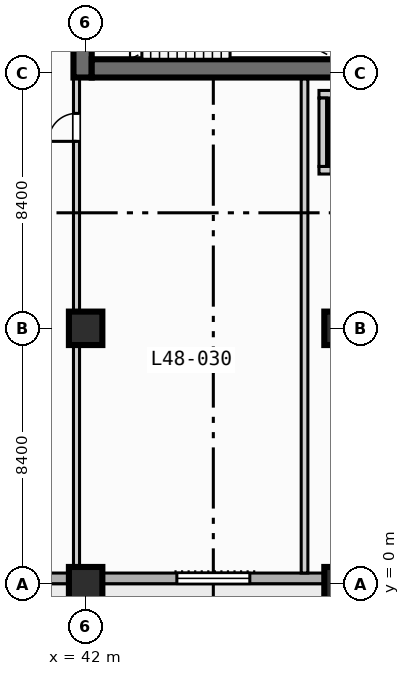
"""IFC4 building model, lengths in metres.
Left out: names, types, materials, properties, quantities, classifications, styles, units other than length and angle.
Written with IfcOpenShell. Run it as: python <this file> out.ifc"""

import sys

from ifc_helpers import new_model, si_unit, direction, frame, frame_2d, origin, origin_2d, place, context, subcontext, project, spatial, rectangle, extrude, element, fill, save


model = new_model("IFC4")
c1 = context("Model", 3, precision=1e-05, world=origin(), true_north=direction((0.0, 1.0)))
c2 = subcontext(c1, "Body", "Model", "MODEL_VIEW")
j1 = project(units=[si_unit("LENGTHUNIT", "METRE"), si_unit("PLANEANGLEUNIT", "RADIAN")], contexts=[c1])
p1 = place(None, origin())
s1 = spatial("IfcSite", under=j1, at=p1, CompositionType="ELEMENT")
p2 = place(p1, origin())
s2 = spatial("IfcBuilding", under=s1, at=p2, CompositionType="ELEMENT")
p3 = place(p2, frame((0.0, 0.0, 197.6)))
s3 = spatial("IfcBuildingStorey", under=s2, at=p3, CompositionType="ELEMENT", Elevation=197.6)
p4 = place(p3, frame((41.9, 16.65, 0.0), z_axis=(0.0, 0.0, 1.0), x_axis=(0.0, 1.0, 0.0)))
e1 = element("IfcWall", 1, at=p4, inside=s3, PredefinedType="SHEAR", context=c2, shape_type="SweptSolid", body=[
    extrude(rectangle(XDim=1.35, YDim=0.6, at=frame_2d((0.675, 0.0))), origin(), (0.0, 0.0, 1.0), 3.47),
])
p5 = place(p3, frame((42.2, 16.95, 0.0), z_axis=(0.0, 0.0, 1.0), x_axis=(1.0, 0.0, 0.0)))
e2 = element("IfcWall", 2, at=p5, inside=s3, PredefinedType="SHEAR", context=c2, shape_type="SweptSolid", body=[
    extrude(rectangle(XDim=16.35, YDim=0.6, at=frame_2d((8.175, 0.0))), origin(), (0.0, 0.0, 1.0), 3.47),
])
for number, where, z_axis, x_axis in (
    (3, (42.0, 0.0, 0.0), (0.0, 0.0, 1.0), (1.0, 0.0, 0.0)),
    (4, (42.0, 8.4, 0.0), (0.0, 0.0, 1.0), (1.0, 0.0, 0.0)),
    (5, (50.4, 0.0, 0.0), (0.0, 0.0, 1.0), (1.0, 0.0, 0.0)),
    (6, (50.4, 8.4, 0.0), (0.0, 0.0, 1.0), (1.0, 0.0, 0.0)),
):
    element("IfcColumn", number, at=place(p3, frame(where, z_axis=z_axis, x_axis=x_axis)), inside=s3, PredefinedType="COLUMN", context=c2, shape_type="SweptSolid", body=[
        extrude(rectangle(XDim=1.1, YDim=1.1, at=origin_2d()), origin(), (0.0, 0.0, 1.0), 3.7),
    ])
p6 = place(p3, frame((72.425, 0.175, 0.0), z_axis=(0.0, 0.0, 1.0), x_axis=(-1.0, 0.0, 0.0)))
e7 = element("IfcWall", 7, at=p6, inside=s3, PredefinedType="STANDARD", context=c2, shape_type="SweptSolid", body=[
    extrude(rectangle(XDim=69.25, YDim=0.35, at=frame_2d((34.625, 0.0))), origin(), (0.0, 0.0, 1.0), 3.47),
])
p7 = place(p6, frame((50.725, 0.0, 0.0)))
e8 = element("IfcOpeningElement", 8, at=p7, cuts=e7, PredefinedType="OPENING", context=c2, shape_type="SweptSolid", body=[
    extrude(rectangle(XDim=1.4, YDim=2.2, at=frame_2d((0.7, 1.1))), frame((0.0, 0.185, 0.0), z_axis=(0.0, -1.0, 0.0), x_axis=(1.0, 0.0, 0.0)), (0.0, 0.0, 1.0), 0.37),
])
p8 = place(p6, frame((58.625, 0.0, 0.85)))
e9 = element("IfcOpeningElement", 9, at=p8, cuts=e7, PredefinedType="OPENING", context=c2, shape_type="SweptSolid", body=[
    extrude(rectangle(XDim=2.4, YDim=1.95, at=frame_2d((1.2, 0.975))), frame((0.0, 0.185, 0.0), z_axis=(0.0, -1.0, 0.0), x_axis=(1.0, 0.0, 0.0)), (0.0, 0.0, 1.0), 0.37),
])
p9 = place(p6, frame((41.825, 0.0, 0.85)))
e10 = element("IfcOpeningElement", 10, at=p9, cuts=e7, PredefinedType="OPENING", context=c2, shape_type="SweptSolid", body=[
    extrude(rectangle(XDim=2.4, YDim=1.95, at=frame_2d((1.2, 0.975))), frame((0.0, 0.185, 0.0), z_axis=(0.0, -1.0, 0.0), x_axis=(1.0, 0.0, 0.0)), (0.0, 0.0, 1.0), 0.37),
])
p10 = place(p6, frame((33.725, 0.0, 0.85)))
e11 = element("IfcOpeningElement", 11, at=p10, cuts=e7, PredefinedType="OPENING", context=c2, shape_type="SweptSolid", body=[
    extrude(rectangle(XDim=1.8, YDim=1.8, at=frame_2d((0.9, 0.9))), frame((0.0, 0.185, 0.0), z_axis=(0.0, -1.0, 0.0), x_axis=(1.0, 0.0, 0.0)), (0.0, 0.0, 1.0), 0.37),
])
p11 = place(p6, frame((25.025, 0.0, 0.85)))
e12 = element("IfcOpeningElement", 12, at=p11, cuts=e7, PredefinedType="OPENING", context=c2, shape_type="SweptSolid", body=[
    extrude(rectangle(XDim=2.4, YDim=1.95, at=frame_2d((1.2, 0.975))), frame((0.0, 0.185, 0.0), z_axis=(0.0, -1.0, 0.0), x_axis=(1.0, 0.0, 0.0)), (0.0, 0.0, 1.0), 0.37),
])
p12 = place(p6, frame((64.875, 0.0, 0.85)))
e13 = element("IfcOpeningElement", 13, at=p12, cuts=e7, PredefinedType="OPENING", context=c2, shape_type="SweptSolid", body=[
    extrude(rectangle(XDim=1.8, YDim=1.8, at=frame_2d((0.9, 0.9))), frame((0.0, 0.185, 0.0), z_axis=(0.0, -1.0, 0.0), x_axis=(1.0, 0.0, 0.0)), (0.0, 0.0, 1.0), 0.37),
])
p13 = place(p3, frame((49.675, 13.6, 0.0), z_axis=(0.0, 0.0, 1.0), x_axis=(1.0, 0.0, 0.0)))
e14 = element("IfcWall", 14, at=p13, inside=s3, PredefinedType="SOLIDWALL", context=c2, shape_type="SweptSolid", body=[
    extrude(rectangle(XDim=2.25, YDim=0.25, at=frame_2d((1.125, 0.0))), origin(), (0.0, 0.0, 1.0), 3.47),
])
p14 = place(p13, frame((0.4, 0.0, 0.0)))
e15 = element("IfcOpeningElement", 15, at=p14, cuts=e14, PredefinedType="OPENING", context=c2, shape_type="SweptSolid", body=[
    extrude(rectangle(XDim=1.1, YDim=2.15, at=frame_2d((0.55, 1.075))), frame((0.0, 0.135, 0.0), z_axis=(0.0, -1.0, 0.0), x_axis=(1.0, 0.0, 0.0)), (0.0, 0.0, 1.0), 0.27),
])
for number, where, z_axis, x_axis in (
    (16, (49.675, 16.1, 0.0), (0.0, 0.0, 1.0), (1.0, 0.0, 0.0)),
    (17, (49.8, 13.725, 0.0), (0.0, 0.0, 1.0), (0.0, 1.0, 0.0)),
):
    element("IfcWall", number, at=place(p3, frame(where, z_axis=z_axis, x_axis=x_axis)), inside=s3, PredefinedType="SOLIDWALL", context=c2, shape_type="SweptSolid", body=[
        extrude(rectangle(XDim=2.25, YDim=0.25, at=frame_2d((1.125, 0.0))), origin(), (0.0, 0.0, 1.0), 3.47),
    ])
p15 = place(p3, frame((41.7, 0.35, 0.0), z_axis=(0.0, 0.0, 1.0), x_axis=(0.0, 1.0, 0.0)))
e18 = element("IfcWall", 18, at=p15, inside=s3, PredefinedType="PARTITIONING", context=c2, shape_type="SweptSolid", body=[
    extrude(rectangle(XDim=16.25, YDim=0.2, at=frame_2d((8.125, 0.0))), origin(), (0.0, 0.0, 1.0), 2.82),
])
p16 = place(p15, frame((14.2, 0.0, 0.0)))
e19 = element("IfcOpeningElement", 19, at=p16, cuts=e18, PredefinedType="OPENING", context=c2, shape_type="SweptSolid", body=[
    extrude(rectangle(XDim=0.92, YDim=2.1, at=frame_2d((0.46, 1.05))), frame((0.0, 0.11, 0.0), z_axis=(0.0, -1.0, 0.0), x_axis=(1.0, 0.0, 0.0)), (0.0, 0.0, 1.0), 0.22),
])
p17 = place(p3, frame((49.2, 0.35, 0.0), z_axis=(0.0, 0.0, 1.0), x_axis=(0.0, 1.0, 0.0)))
e20 = element("IfcWall", 20, at=p17, inside=s3, PredefinedType="PARTITIONING", context=c2, shape_type="SweptSolid", body=[
    extrude(rectangle(XDim=16.25, YDim=0.22, at=frame_2d((8.125, 0.0))), origin(), (0.0, 0.0, 1.0), 3.47),
])
p18 = place(p11, origin())
e21 = element("IfcWindow", 21, at=p18, inside=s3, PartitioningType="SINGLE_PANEL", PredefinedType="WINDOW", context=c2, shape_type="SweptSolid", body=[
    extrude(rectangle(XDim=2.4, YDim=1.95, at=frame_2d((1.2, 0.975))), frame((0.0, 0.03, 0.0), z_axis=(0.0, -1.0, 0.0), x_axis=(1.0, 0.0, 0.0)), (0.0, 0.0, 1.0), 0.06),
])
fill(e12, e21)
p19 = place(p16, origin())
e22 = element("IfcDoor", 22, at=p19, inside=s3, OperationType="SINGLE_SWING_LEFT", PredefinedType="DOOR", context=c2, shape_type="SweptSolid", body=[
    extrude(rectangle(XDim=0.92, YDim=2.1, at=frame_2d((0.46, 1.05))), frame((0.0, 0.025, 0.0), z_axis=(0.0, -1.0, 0.0), x_axis=(1.0, 0.0, 0.0)), (0.0, 0.0, 1.0), 0.05),
])
fill(e19, e22)
save(model, sys.argv[1])
